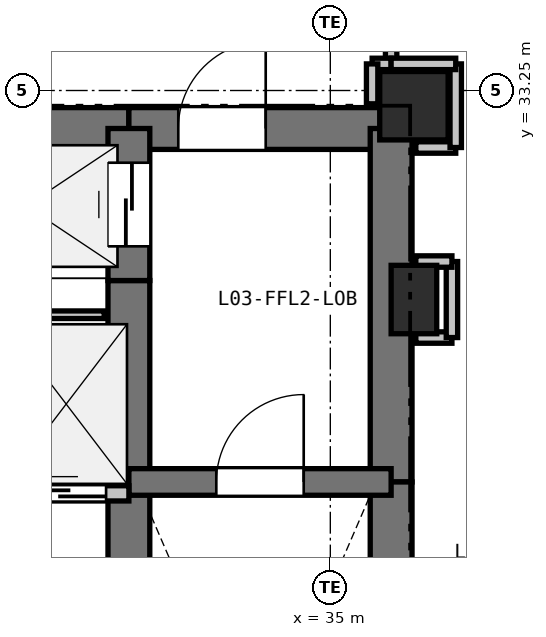
"""IFC4 building model, lengths in metres.
Left out: names, types, materials, properties, quantities, classifications, styles, units other than length and angle.
Written with IfcOpenShell. Run it as: python <this file> out.ifc"""

import sys

from ifc_helpers import new_model, si_unit, direction, frame, frame_2d, origin, origin_2d, place, context, subcontext, project, spatial, rectangle, extrude, element, fill, save


model = new_model("IFC4")
c1 = context("Model", 3, precision=1e-05, world=origin(), true_north=direction((0.0, 1.0)))
c2 = subcontext(c1, "Body", "Model", "MODEL_VIEW")
j1 = project(units=[si_unit("LENGTHUNIT", "METRE"), si_unit("PLANEANGLEUNIT", "RADIAN")], contexts=[c1])
p1 = place(None, origin())
s1 = spatial("IfcSite", under=j1, at=p1, CompositionType="ELEMENT")
p2 = place(p1, origin())
s2 = spatial("IfcBuilding", under=s1, at=p2, CompositionType="ELEMENT")
p3 = place(p2, frame((0.0, 0.0, 14.4)))
s3 = spatial("IfcBuildingStorey", under=s2, at=p3, CompositionType="ELEMENT", Elevation=14.4)
p4 = place(p3, frame((36.1, 33.05, 0.0), z_axis=(0.0, 0.0, 1.0), x_axis=(1.0, 0.0, 0.0)))
e1 = element("IfcColumn", 1, at=p4, inside=s3, PredefinedType="COLUMN", context=c2, shape_type="SweptSolid", body=[
    extrude(rectangle(XDim=0.9, YDim=0.9, at=origin_2d()), origin(), (0.0, 0.0, 1.0), 4.8),
])
p5 = place(p3, frame((36.1, 30.5, 0.0), z_axis=(0.0, 0.0, 1.0), x_axis=(1.0, 0.0, 0.0)))
e2 = element("IfcColumn", 2, at=p5, inside=s3, PredefinedType="PILASTER", context=c2, shape_type="SweptSolid", body=[
    extrude(rectangle(XDim=0.6, YDim=0.9, at=origin_2d()), origin(), (0.0, 0.0, 1.0), 4.8),
])
p6 = place(p3, frame((29.65, 32.75, 0.0), z_axis=(0.0, 0.0, 1.0), x_axis=(1.0, 0.0, 0.0)))
e3 = element("IfcWall", 3, at=p6, inside=s3, PredefinedType="SHEAR", context=c2, shape_type="SweptSolid", body=[
    extrude(rectangle(XDim=2.7, YDim=0.55, at=frame_2d((1.35, 0.0))), origin(), (0.0, 0.0, 1.0), 4.52),
])
p7 = place(p3, frame((32.35, 32.75, 0.0), z_axis=(0.0, 0.0, 1.0), x_axis=(1.0, 0.0, 0.0)))
e4 = element("IfcWall", 4, at=p7, inside=s3, PredefinedType="SHEAR", context=c2, shape_type="SweptSolid", body=[
    extrude(rectangle(XDim=3.45, YDim=0.55, at=frame_2d((1.725, 0.0))), origin(), (0.0, 0.0, 1.0), 4.52),
])
p8 = place(p7, frame((0.65, 0.0, 0.0)))
e5 = element("IfcOpeningElement", 5, at=p8, cuts=e4, PredefinedType="OPENING", context=c2, shape_type="SweptSolid", body=[
    extrude(rectangle(XDim=1.15, YDim=2.15, at=frame_2d((0.575, 1.075))), frame((0.0, 0.285, 0.0), z_axis=(0.0, -1.0, 0.0), x_axis=(1.0, 0.0, 0.0)), (0.0, 0.0, 1.0), 0.57),
])
p9 = place(p3, frame((35.8, 32.75, 0.0), z_axis=(0.0, 0.0, 1.0), x_axis=(0.0, -1.0, 0.0)))
e6 = element("IfcWall", 6, at=p9, inside=s3, PredefinedType="SHEAR", context=c2, shape_type="SweptSolid", body=[
    extrude(rectangle(XDim=4.65, YDim=0.55, at=frame_2d((2.325, 0.0))), origin(), (0.0, 0.0, 1.0), 4.52),
])
p10 = place(p3, frame((35.8, 28.1, 0.0), z_axis=(0.0, 0.0, 1.0), x_axis=(0.0, -1.0, 0.0)))
e7 = element("IfcWall", 7, at=p10, inside=s3, PredefinedType="SHEAR", context=c2, shape_type="SweptSolid", body=[
    extrude(rectangle(XDim=7.35, YDim=0.55, at=frame_2d((3.675, 0.0))), origin(), (0.0, 0.0, 1.0), 4.52),
])
p11 = place(p3, frame((32.35, 25.55, 0.0), z_axis=(0.0, 0.0, 1.0), x_axis=(0.0, 1.0, 0.0)))
e8 = element("IfcWall", 8, at=p11, inside=s3, PredefinedType="SHEAR", context=c2, shape_type="SweptSolid", body=[
    extrude(rectangle(XDim=2.4, YDim=0.55, at=frame_2d((1.2, 0.0))), origin(), (0.0, 0.0, 1.0), 4.52),
])
p12 = place(p3, frame((32.35, 27.95, 0.0), z_axis=(0.0, 0.0, 1.0), x_axis=(0.0, 1.0, 0.0)))
e9 = element("IfcWall", 9, at=p12, inside=s3, PredefinedType="SHEAR", context=c2, shape_type="SweptSolid", body=[
    extrude(rectangle(XDim=2.8, YDim=0.55, at=frame_2d((1.4, 0.0))), origin(), (0.0, 0.0, 1.0), 4.52),
])
p13 = place(p3, frame((32.35, 30.75, 0.0), z_axis=(0.0, 0.0, 1.0), x_axis=(0.0, 1.0, 0.0)))
e10 = element("IfcWall", 10, at=p13, inside=s3, PredefinedType="SHEAR", context=c2, shape_type="SweptSolid", body=[
    extrude(rectangle(XDim=2.0, YDim=0.55, at=frame_2d((1.0, 0.0))), origin(), (0.0, 0.0, 1.0), 4.52),
])
p14 = place(p13, frame((0.45, 0.0, 0.0)))
e11 = element("IfcOpeningElement", 11, at=p14, cuts=e10, PredefinedType="OPENING", context=c2, shape_type="SweptSolid", body=[
    extrude(rectangle(XDim=1.1, YDim=2.15, at=frame_2d((0.55, 1.075))), frame((0.0, 0.285, 0.0), z_axis=(0.0, -1.0, 0.0), x_axis=(1.0, 0.0, 0.0)), (0.0, 0.0, 1.0), 0.57),
])
p15 = place(p3, frame((32.35, 28.1, 0.0), z_axis=(0.0, 0.0, 1.0), x_axis=(1.0, 0.0, 0.0)))
e12 = element("IfcWall", 12, at=p15, inside=s3, PredefinedType="SHEAR", context=c2, shape_type="SweptSolid", body=[
    extrude(rectangle(XDim=3.45, YDim=0.35, at=frame_2d((1.725, 0.0))), origin(), (0.0, 0.0, 1.0), 4.52),
])
p16 = place(p15, frame((1.15, 0.0, 0.0)))
e13 = element("IfcOpeningElement", 13, at=p16, cuts=e12, PredefinedType="OPENING", context=c2, shape_type="SweptSolid", body=[
    extrude(rectangle(XDim=1.15, YDim=2.15, at=frame_2d((0.575, 1.075))), frame((0.0, 0.185, 0.0), z_axis=(0.0, -1.0, 0.0), x_axis=(1.0, 0.0, 0.0)), (0.0, 0.0, 1.0), 0.37),
])
p17 = place(p3, frame((27.4, 27.95, 0.0), z_axis=(0.0, 0.0, 1.0), x_axis=(1.0, 0.0, 0.0)))
e14 = element("IfcWall", 14, at=p17, inside=s3, PredefinedType="PARTITIONING", context=c2, shape_type="SweptSolid", body=[
    extrude(rectangle(XDim=4.95, YDim=0.2, at=frame_2d((2.475, 0.0))), origin(), (0.0, 0.0, 1.0), 4.52),
])
p18 = place(p17, frame((0.25, 0.0, 0.0)))
e15 = element("IfcOpeningElement", 15, at=p18, cuts=e14, PredefinedType="OPENING", context=c2, shape_type="SweptSolid", body=[
    extrude(rectangle(XDim=1.1, YDim=2.15, at=frame_2d((0.55, 1.075))), frame((0.0, 0.11, 0.0), z_axis=(0.0, -1.0, 0.0), x_axis=(1.0, 0.0, 0.0)), (0.0, 0.0, 1.0), 0.22),
])
p19 = place(p17, frame((1.9, 0.0, 0.0)))
e16 = element("IfcOpeningElement", 16, at=p19, cuts=e14, PredefinedType="OPENING", context=c2, shape_type="SweptSolid", body=[
    extrude(rectangle(XDim=1.1, YDim=2.15, at=frame_2d((0.55, 1.075))), frame((0.0, 0.11, 0.0), z_axis=(0.0, -1.0, 0.0), x_axis=(1.0, 0.0, 0.0)), (0.0, 0.0, 1.0), 0.22),
])
p20 = place(p17, frame((3.55, 0.0, 0.0)))
e17 = element("IfcOpeningElement", 17, at=p20, cuts=e14, PredefinedType="OPENING", context=c2, shape_type="SweptSolid", body=[
    extrude(rectangle(XDim=1.1, YDim=2.15, at=frame_2d((0.55, 1.075))), frame((0.0, 0.11, 0.0), z_axis=(0.0, -1.0, 0.0), x_axis=(1.0, 0.0, 0.0)), (0.0, 0.0, 1.0), 0.22),
])
p21 = place(p3, frame((32.025, 30.3, 0.0), z_axis=(0.0, 0.0, 1.0), x_axis=(-1.0, 0.0, 0.0)))
e18 = element("IfcWall", 18, at=p21, inside=s3, PredefinedType="PARTITIONING", context=c2, shape_type="SweptSolid", body=[
    extrude(rectangle(XDim=1.325, YDim=0.1, at=frame_2d((0.663, 0.0))), origin(), (0.0, 0.0, 1.0), 4.52),
])
p22 = place(p3, frame((35.8, 36.05, 0.0), z_axis=(0.0, 0.0, 1.0), x_axis=(0.0, -1.0, 0.0)))
e19 = element("IfcWall", 19, at=p22, inside=s3, PredefinedType="PARTITIONING", context=c2, shape_type="SweptSolid", body=[
    extrude(rectangle(XDim=2.45, YDim=0.15, at=frame_2d((1.225, 0.0))), origin(), (0.0, 0.0, 1.0), 4.52),
])
p23 = place(p22, frame((0.725, 0.0, 0.0)))
e20 = element("IfcOpeningElement", 20, at=p23, cuts=e19, PredefinedType="OPENING", context=c2, shape_type="SweptSolid", body=[
    extrude(rectangle(XDim=1.0, YDim=2.15, at=frame_2d((0.5, 1.075))), frame((0.0, 0.085, 0.0), z_axis=(0.0, -1.0, 0.0), x_axis=(1.0, 0.0, 0.0)), (0.0, 0.0, 1.0), 0.17),
])
p24 = place(p3, frame((35.8, 33.6, 0.0), z_axis=(0.0, 0.0, 1.0), x_axis=(-1.0, 0.0, 0.0)))
e21 = element("IfcWall", 21, at=p24, inside=s3, PredefinedType="PARTITIONING", context=c2, shape_type="SweptSolid", body=[
    extrude(rectangle(XDim=0.25, YDim=0.15, at=frame_2d((0.125, 0.0))), origin(), (0.0, 0.0, 1.0), 4.52),
])
p25 = place(p3, frame((35.55, 33.6, 0.0), z_axis=(0.0, 0.0, 1.0), x_axis=(0.0, -1.0, 0.0)))
e22 = element("IfcWall", 22, at=p25, inside=s3, PredefinedType="PARTITIONING", context=c2, shape_type="SweptSolid", body=[
    extrude(rectangle(XDim=0.525, YDim=0.15, at=frame_2d((0.263, 0.0))), origin(), (0.0, 0.0, 1.0), 3.969),
])
p26 = place(p3, frame((36.125, 30.0, 0.0), z_axis=(0.0, 0.0, 1.0), x_axis=(1.0, 0.0, 0.0)))
e23 = element("IfcWall", 23, at=p26, inside=s3, PredefinedType="PARTITIONING", context=c2, shape_type="SweptSolid", body=[
    extrude(rectangle(XDim=0.475, YDim=0.15, at=frame_2d((0.238, 0.0))), origin(), (0.0, 0.0, 1.0), 3.969),
])
p27 = place(p3, frame((36.6, 30.0, 0.0), z_axis=(0.0, 0.0, 1.0), x_axis=(0.0, 1.0, 0.0)))
e24 = element("IfcWall", 24, at=p27, inside=s3, PredefinedType="PARTITIONING", context=c2, shape_type="SweptSolid", body=[
    extrude(rectangle(XDim=1.0, YDim=0.15, at=frame_2d((0.5, 0.0))), origin(), (0.0, 0.0, 1.0), 4.52),
])
p28 = place(p3, frame((36.6, 31.0, 0.0), z_axis=(0.0, 0.0, 1.0), x_axis=(-1.0, 0.0, 0.0)))
e25 = element("IfcWall", 25, at=p28, inside=s3, PredefinedType="PARTITIONING", context=c2, shape_type="SweptSolid", body=[
    extrude(rectangle(XDim=0.475, YDim=0.15, at=frame_2d((0.238, 0.0))), origin(), (0.0, 0.0, 1.0), 3.969),
])
p29 = place(p3, frame((36.125, 32.5, 0.0), z_axis=(0.0, 0.0, 1.0), x_axis=(1.0, 0.0, 0.0)))
e26 = element("IfcWall", 26, at=p29, inside=s3, PredefinedType="PARTITIONING", context=c2, shape_type="SweptSolid", body=[
    extrude(rectangle(XDim=0.525, YDim=0.15, at=frame_2d((0.262, 0.0))), origin(), (0.0, 0.0, 1.0), 3.969),
])
p30 = place(p3, frame((36.65, 32.5, 0.0), z_axis=(0.0, 0.0, 1.0), x_axis=(0.0, 1.0, 0.0)))
e27 = element("IfcWall", 27, at=p30, inside=s3, PredefinedType="PARTITIONING", context=c2, shape_type="SweptSolid", body=[
    extrude(rectangle(XDim=1.1, YDim=0.15, at=frame_2d((0.55, 0.0))), origin(), (0.0, 0.0, 1.0), 3.818),
])
p31 = place(p3, frame((36.65, 33.6, 0.0), z_axis=(0.0, 0.0, 1.0), x_axis=(-1.0, 0.0, 0.0)))
e28 = element("IfcWall", 28, at=p31, inside=s3, PredefinedType="PARTITIONING", context=c2, shape_type="SweptSolid", body=[
    extrude(rectangle(XDim=0.85, YDim=0.15, at=frame_2d((0.425, 0.0))), origin(), (0.0, 0.0, 1.0), 3.818),
])
p32 = place(p20, origin())
e29 = element("IfcDoor", 29, at=p32, inside=s3, OperationType="SLIDING_TO_LEFT", PredefinedType="DOOR", context=c2, shape_type="SweptSolid", body=[
    extrude(rectangle(XDim=1.1, YDim=2.15, at=frame_2d((0.55, 1.075))), frame((0.0, 0.025, 0.0), z_axis=(0.0, -1.0, 0.0), x_axis=(1.0, 0.0, 0.0)), (0.0, 0.0, 1.0), 0.05),
])
fill(e17, e29)
p33 = place(p14, origin())
e30 = element("IfcDoor", 30, at=p33, inside=s3, OperationType="SLIDING_TO_LEFT", PredefinedType="DOOR", context=c2, shape_type="SweptSolid", body=[
    extrude(rectangle(XDim=1.1, YDim=2.15, at=frame_2d((0.55, 1.075))), frame((0.0, 0.025, 0.0), z_axis=(0.0, -1.0, 0.0), x_axis=(1.0, 0.0, 0.0)), (0.0, 0.0, 1.0), 0.05),
])
fill(e11, e30)
p34 = place(p16, origin())
e31 = element("IfcDoor", 31, at=p34, inside=s3, OperationType="SINGLE_SWING_RIGHT", PredefinedType="DOOR", context=c2, shape_type="SweptSolid", body=[
    extrude(rectangle(XDim=1.15, YDim=2.15, at=frame_2d((0.575, 1.075))), frame((0.0, 0.025, 0.0), z_axis=(0.0, -1.0, 0.0), x_axis=(1.0, 0.0, 0.0)), (0.0, 0.0, 1.0), 0.05),
])
fill(e13, e31)
p35 = place(p8, origin())
e32 = element("IfcDoor", 32, at=p35, inside=s3, OperationType="SINGLE_SWING_RIGHT", PredefinedType="DOOR", context=c2, shape_type="SweptSolid", body=[
    extrude(rectangle(XDim=1.15, YDim=2.15, at=frame_2d((0.575, 1.075))), frame((0.0, 0.025, 0.0), z_axis=(0.0, -1.0, 0.0), x_axis=(1.0, 0.0, 0.0)), (0.0, 0.0, 1.0), 0.05),
])
fill(e5, e32)
save(model, sys.argv[1])
